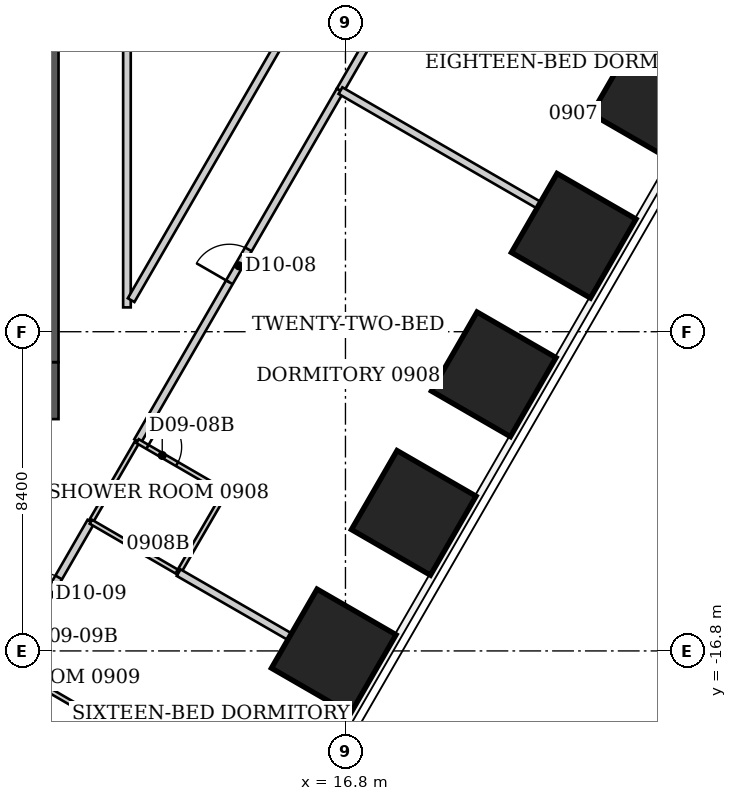
"""IFC4 building model, lengths in metres.
Left out: names, types, materials, properties, quantities, classifications, styles, units other than length and angle.
Written with IfcOpenShell. Run it as: python <this file> out.ifc"""

import sys

from ifc_helpers import new_model, si_unit, direction, frame, frame_2d, origin, origin_2d, place, context, subcontext, project, spatial, rectangle, extrude, element, fill, save


model = new_model("IFC4")
c1 = context("Model", 3, precision=1e-05, world=origin(), true_north=direction((0.0, 1.0)))
c2 = subcontext(c1, "Body", "Model", "MODEL_VIEW")
j1 = project(units=[si_unit("LENGTHUNIT", "METRE"), si_unit("PLANEANGLEUNIT", "RADIAN")], contexts=[c1])
p1 = place(None, origin())
s1 = spatial("IfcSite", under=j1, at=p1, CompositionType="ELEMENT")
p2 = place(p1, origin())
s2 = spatial("IfcBuilding", under=s1, at=p2, CompositionType="ELEMENT")
p3 = place(p2, frame((0.0, 0.0, 42.0)))
s3 = spatial("IfcBuildingStorey", under=s2, at=p3, CompositionType="ELEMENT", Elevation=42.0)
for number, where, z_axis, x_axis in (
    (1, (24.911, -2.23, 0.0), (0.0, 0.0, 1.0), (0.866, -0.5, 0.0)),
    (2, (22.806, -5.875, 0.0), (0.0, 0.0, 1.0), (0.866, -0.5, 0.0)),
    (3, (20.701, -9.521, 0.0), (0.0, 0.0, 1.0), (0.866, -0.5, 0.0)),
    (4, (18.596, -13.167, 0.0), (0.0, 0.0, 1.0), (0.866, -0.5, 0.0)),
    (5, (16.491, -16.813, 0.0), (0.0, 0.0, 1.0), (0.866, -0.5, 0.0)),
):
    element("IfcColumn", number, at=place(p3, frame(where, z_axis=z_axis, x_axis=x_axis)), inside=s3, PredefinedType="COLUMN", context=c2, shape_type="SweptSolid", body=[
        extrude(rectangle(XDim=2.4, YDim=2.4, at=origin_2d()), origin(), (0.0, 0.0, 1.0), 3.8),
    ])
p4 = place(p3, frame((-9.25, -9.95, 0.0), z_axis=(0.0, 0.0, 1.0), x_axis=(1.0, 0.0, 0.0)))
e6 = element("IfcWall", 6, at=p4, inside=s3, PredefinedType="SHEAR", context=c2, shape_type="SweptSolid", body=[
    extrude(rectangle(XDim=18.5, YDim=1.5, at=frame_2d((9.25, 0.0))), origin(), (0.0, 0.0, 1.0), 3.8),
])
p5 = place(p4, frame((2.137, 0.0, 0.0)))
e7 = element("IfcOpeningElement", 7, at=p5, cuts=e6, PredefinedType="OPENING", context=c2, shape_type="SweptSolid", body=[
    extrude(rectangle(XDim=1.1, YDim=2.1, at=frame_2d((0.55, 1.05))), frame((0.0, 0.75, 0.0), z_axis=(0.0, -1.0, 0.0), x_axis=(1.0, 0.0, 0.0)), (0.0, 0.0, 1.0), 1.5),
])
p6 = place(p4, frame((4.762, 0.0, 0.0)))
e8 = element("IfcOpeningElement", 8, at=p6, cuts=e6, PredefinedType="OPENING", context=c2, shape_type="SweptSolid", body=[
    extrude(rectangle(XDim=1.1, YDim=2.1, at=frame_2d((0.55, 1.05))), frame((0.0, 0.75, 0.0), z_axis=(0.0, -1.0, 0.0), x_axis=(1.0, 0.0, 0.0)), (0.0, 0.0, 1.0), 1.5),
])
p7 = place(p4, frame((7.387, 0.0, 0.0)))
e9 = element("IfcOpeningElement", 9, at=p7, cuts=e6, PredefinedType="OPENING", context=c2, shape_type="SweptSolid", body=[
    extrude(rectangle(XDim=1.1, YDim=2.1, at=frame_2d((0.55, 1.05))), frame((0.0, 0.75, 0.0), z_axis=(0.0, -1.0, 0.0), x_axis=(1.0, 0.0, 0.0)), (0.0, 0.0, 1.0), 1.5),
])
p8 = place(p3, frame((8.5, -9.2, 0.0), z_axis=(0.0, 0.0, 1.0), x_axis=(0.0, 1.0, 0.0)))
e10 = element("IfcWall", 10, at=p8, inside=s3, PredefinedType="SHEAR", context=c2, shape_type="SweptSolid", body=[
    extrude(rectangle(XDim=15.3, YDim=1.5, at=frame_2d((7.65, 0.0))), origin(), (0.0, 0.0, 1.0), 3.8),
])
p9 = place(p8, frame((10.7, 0.0, 0.0)))
e11 = element("IfcOpeningElement", 11, at=p9, cuts=e10, PredefinedType="OPENING", context=c2, shape_type="SweptSolid", body=[
    extrude(rectangle(XDim=1.2, YDim=2.2, at=frame_2d((0.6, 1.1))), frame((0.0, 0.75, 0.0), z_axis=(0.0, -1.0, 0.0), x_axis=(1.0, 0.0, 0.0)), (0.0, 0.0, 1.0), 1.5),
])
p10 = place(p3, frame((7.909, -17.199, 0.0), z_axis=(0.0, 0.0, 1.0), x_axis=(0.499528080516, 0.866297695239, 0.0)))
e12 = element("IfcWall", 12, at=p10, inside=s3, PredefinedType="PARTITIONING", context=c2, shape_type="SweptSolid", body=[
    extrude(rectangle(XDim=4.386, YDim=0.2, at=frame_2d((2.193, 0.0))), origin(), (0.0, 0.0, 1.0), 3.64),
])
p11 = place(p10, frame((1.693, 0.0, 0.0)))
e13 = element("IfcOpeningElement", 13, at=p11, cuts=e12, PredefinedType="OPENING", context=c2, shape_type="SweptSolid", body=[
    extrude(rectangle(XDim=1.0, YDim=2.13, at=frame_2d((0.5, 1.065))), frame((0.0, 0.1, 0.0), z_axis=(0.0, -1.0, 0.0), x_axis=(1.0, 0.0, 0.0)), (0.0, 0.0, 1.0), 0.2),
])
p12 = place(p3, frame((8.97, -20.71, 0.0), z_axis=(0.0, 0.0, 1.0), x_axis=(0.499159685399, 0.866510016372, 0.0)))
e14 = element("IfcWall", 14, at=p12, inside=s3, PredefinedType="PARTITIONING", context=c2, shape_type="SweptSolid", body=[
    extrude(rectangle(XDim=2.504, YDim=0.12, at=frame_2d((1.252, 0.0))), origin(), (0.0, 0.0, 1.0), 3.64),
])
p13 = place(p3, frame((10.1, -13.4, 0.0), z_axis=(0.0, 0.0, 1.0), x_axis=(0.501856726365, 0.86495076519, 0.0)))
e15 = element("IfcWall", 15, at=p13, inside=s3, PredefinedType="PARTITIONING", context=c2, shape_type="SweptSolid", body=[
    extrude(rectangle(XDim=2.451, YDim=0.12, at=frame_2d((1.226, 0.0))), origin(), (0.0, 0.0, 1.0), 3.64),
])
p14 = place(p3, frame((10.1, -13.4, 0.0), z_axis=(0.0, 0.0, 1.0), x_axis=(0.864966903181, -0.501828911485, 0.0)))
e16 = element("IfcWall", 16, at=p14, inside=s3, PredefinedType="PARTITIONING", context=c2, shape_type="SweptSolid", body=[
    extrude(rectangle(XDim=2.67, YDim=0.12, at=frame_2d((1.335, 0.0))), origin(), (0.0, 0.0, 1.0), 3.64),
])
p15 = place(p3, frame((10.22, -18.54, 0.0), z_axis=(0.0, 0.0, 1.0), x_axis=(-0.86498992408, 0.501789229896, 0.0)))
e17 = element("IfcWall", 17, at=p15, inside=s3, PredefinedType="PARTITIONING", context=c2, shape_type="SweptSolid", body=[
    extrude(rectangle(XDim=2.671, YDim=0.12, at=frame_2d((1.335, 0.0))), origin(), (0.0, 0.0, 1.0), 3.64),
])
p16 = place(p15, frame((1.47, 0.0, 0.0)))
e18 = element("IfcOpeningElement", 18, at=p16, cuts=e17, PredefinedType="OPENING", context=c2, shape_type="SweptSolid", body=[
    extrude(rectangle(XDim=0.9, YDim=2.03, at=frame_2d((0.45, 1.015))), frame((0.0, 0.06, 0.0), z_axis=(0.0, -1.0, 0.0), x_axis=(1.0, 0.0, 0.0)), (0.0, 0.0, 1.0), 0.12),
])
p17 = place(p3, frame((11.05, -7.76, 0.0), z_axis=(0.0, 0.0, 1.0), x_axis=(0.0, 1.0, 0.0)))
e19 = element("IfcWall", 19, at=p17, inside=s3, PredefinedType="PARTITIONING", context=c2, shape_type="SweptSolid", body=[
    extrude(rectangle(XDim=17.16, YDim=0.2, at=frame_2d((8.58, 0.0))), origin(), (0.0, 0.0, 1.0), 3.64),
])
p18 = place(p17, frame((8.03, 0.0, 0.0)))
e20 = element("IfcOpeningElement", 20, at=p18, cuts=e19, PredefinedType="OPENING", context=c2, shape_type="SweptSolid", body=[
    extrude(rectangle(XDim=1.1, YDim=2.2, at=frame_2d((0.55, 1.1))), frame((0.0, 0.1, 0.0), z_axis=(0.0, -1.0, 0.0), x_axis=(1.0, 0.0, 0.0)), (0.0, 0.0, 1.0), 0.2),
])
p19 = place(p3, frame((11.33, -11.28, 0.0), z_axis=(0.0, 0.0, 1.0), x_axis=(0.50006348966, 0.865988744909, 0.0)))
e21 = element("IfcWall", 21, at=p19, inside=s3, PredefinedType="PARTITIONING", context=c2, shape_type="SweptSolid", body=[
    extrude(rectangle(XDim=10.658, YDim=0.2, at=frame_2d((5.329, 0.0))), origin(), (0.0, 0.0, 1.0), 3.64),
])
p20 = place(p19, frame((4.829, 0.0, 0.0)))
e22 = element("IfcOpeningElement", 22, at=p20, cuts=e21, PredefinedType="OPENING", context=c2, shape_type="SweptSolid", body=[
    extrude(rectangle(XDim=1.0, YDim=2.13, at=frame_2d((0.5, 1.065))), frame((0.0, 0.1, 0.0), z_axis=(0.0, -1.0, 0.0), x_axis=(1.0, 0.0, 0.0)), (0.0, 0.0, 1.0), 0.2),
])
p21 = place(p3, frame((12.41, -14.74, 0.0), z_axis=(0.0, 0.0, 1.0), x_axis=(0.501813488763, 0.864975850817, 0.0)))
e23 = element("IfcWall", 23, at=p21, inside=s3, PredefinedType="PARTITIONING", context=c2, shape_type="SweptSolid", body=[
    extrude(rectangle(XDim=2.451, YDim=0.12, at=frame_2d((1.226, 0.0))), origin(), (0.0, 0.0, 1.0), 3.64),
])
p22 = place(p3, frame((13.64, -12.62, 0.0), z_axis=(0.0, 0.0, 1.0), x_axis=(-0.864966903181, 0.501828911485, 0.0)))
e24 = element("IfcWall", 24, at=p22, inside=s3, PredefinedType="PARTITIONING", context=c2, shape_type="SweptSolid", body=[
    extrude(rectangle(XDim=2.67, YDim=0.12, at=frame_2d((1.335, 0.0))), origin(), (0.0, 0.0, 1.0), 3.64),
])
p23 = place(p22, frame((1.47, 0.0, 0.0)))
e25 = element("IfcOpeningElement", 25, at=p23, cuts=e24, PredefinedType="OPENING", context=c2, shape_type="SweptSolid", body=[
    extrude(rectangle(XDim=0.9, YDim=2.03, at=frame_2d((0.45, 1.015))), frame((0.0, 0.06, 0.0), z_axis=(0.0, -1.0, 0.0), x_axis=(1.0, 0.0, 0.0)), (0.0, 0.0, 1.0), 0.12),
])
p24 = place(p3, frame((16.66, -2.05, 0.0), z_axis=(0.0, 0.0, 1.0), x_axis=(0.499994452889, 0.866028606387, 0.0)))
e26 = element("IfcWall", 26, at=p24, inside=s3, PredefinedType="PARTITIONING", context=c2, shape_type="SweptSolid", body=[
    extrude(rectangle(XDim=5.775, YDim=0.2, at=frame_2d((2.888, 0.0))), origin(), (0.0, 0.0, 1.0), 3.64),
])
p25 = place(p24, frame((2.388, 0.0, 0.0)))
e27 = element("IfcOpeningElement", 27, at=p25, cuts=e26, PredefinedType="OPENING", context=c2, shape_type="SweptSolid", body=[
    extrude(rectangle(XDim=1.0, YDim=2.13, at=frame_2d((0.5, 1.065))), frame((0.0, 0.1, 0.0), z_axis=(0.0, -1.0, 0.0), x_axis=(1.0, 0.0, 0.0)), (0.0, 0.0, 1.0), 0.2),
])
p26 = place(p3, frame((17.3, 3.06, 0.0), z_axis=(0.0, 0.0, 1.0), x_axis=(-0.500175206663, -0.865924224537, 0.0)))
e28 = element("IfcWall", 28, at=p26, inside=s3, PredefinedType="PARTITIONING", context=c2, shape_type="SweptSolid", body=[
    extrude(rectangle(XDim=12.275, YDim=0.2, at=frame_2d((6.138, 0.0))), origin(), (0.0, 0.0, 1.0), 3.64),
])
p27 = place(p3, frame((17.356, -17.59, 0.0), z_axis=(0.0, 0.0, 1.0), x_axis=(-0.866442508333, 0.499276856818, 0.0)))
e29 = element("IfcWall", 29, at=p27, inside=s3, PredefinedType="PARTITIONING", context=c2, shape_type="SweptSolid", body=[
    extrude(rectangle(XDim=5.708, YDim=0.2, at=frame_2d((2.854, 0.0))), origin(), (0.0, 0.0, 1.0), 3.64),
])
p28 = place(p3, frame((23.916, -6.24, 0.0), z_axis=(0.0, 0.0, 1.0), x_axis=(-0.865982991691, 0.500073452706, 0.0)))
e30 = element("IfcWall", 30, at=p28, inside=s3, PredefinedType="PARTITIONING", context=c2, shape_type="SweptSolid", body=[
    extrude(rectangle(XDim=8.369, YDim=0.2, at=frame_2d((4.185, 0.0))), origin(), (0.0, 0.0, 1.0), 3.64),
])
p29 = place(p20, origin())
e31 = element("IfcDoor", 31, at=p29, inside=s3, OperationType="SINGLE_SWING_LEFT", PredefinedType="DOOR", context=c2, shape_type="SweptSolid", body=[
    extrude(rectangle(XDim=1.0, YDim=2.13, at=frame_2d((0.5, 1.065))), frame((0.0, 0.025, 0.0), z_axis=(0.0, -1.0, 0.0), x_axis=(1.0, 0.0, 0.0)), (0.0, 0.0, 1.0), 0.05),
])
fill(e22, e31)
p30 = place(p23, origin())
e32 = element("IfcDoor", 32, at=p30, inside=s3, OperationType="SINGLE_SWING_RIGHT", PredefinedType="DOOR", context=c2, shape_type="SweptSolid", body=[
    extrude(rectangle(XDim=0.9, YDim=2.03, at=frame_2d((0.45, 1.015))), frame((0.0, 0.025, 0.0), z_axis=(0.0, -1.0, 0.0), x_axis=(1.0, 0.0, 0.0)), (0.0, 0.0, 1.0), 0.05),
])
fill(e25, e32)
p31 = place(p11, origin())
e33 = element("IfcDoor", 33, at=p31, inside=s3, OperationType="SINGLE_SWING_LEFT", PredefinedType="DOOR", context=c2, shape_type="SweptSolid", body=[
    extrude(rectangle(XDim=1.0, YDim=2.13, at=frame_2d((0.5, 1.065))), frame((0.0, 0.025, 0.0), z_axis=(0.0, -1.0, 0.0), x_axis=(1.0, 0.0, 0.0)), (0.0, 0.0, 1.0), 0.05),
])
fill(e13, e33)
save(model, sys.argv[1])
